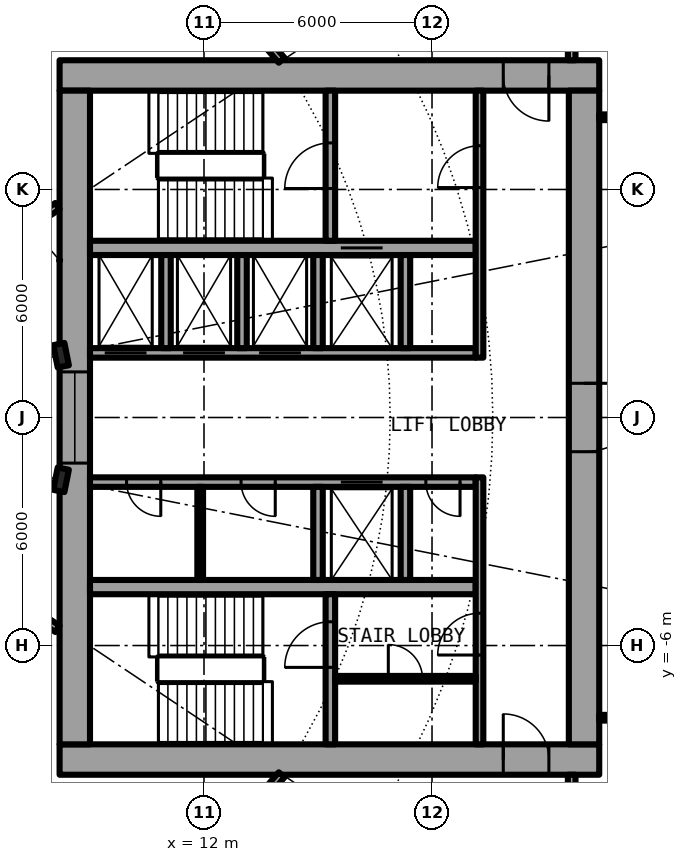
"""IFC4 building model, lengths in metres.
Left out: names, types, materials, properties, quantities, classifications, styles, units other than length and angle.
Written with IfcOpenShell. Run it as: python <this file> out.ifc"""

import sys

from ifc_helpers import new_model, si_unit, direction, frame, frame_2d, origin, origin_2d, place, context, subcontext, project, spatial, rectangle, i_section, extrude, element, fill, save


model = new_model("IFC4")
c1 = context("Model", 3, precision=1e-05, world=origin(), true_north=direction((0.0, 1.0)))
c2 = subcontext(c1, "Body", "Model", "MODEL_VIEW")
j1 = project(units=[si_unit("LENGTHUNIT", "METRE"), si_unit("PLANEANGLEUNIT", "RADIAN")], contexts=[c1])
p1 = place(None, origin())
s1 = spatial("IfcSite", under=j1, at=p1, CompositionType="ELEMENT")
p2 = place(p1, origin())
s2 = spatial("IfcBuilding", under=s1, at=p2, CompositionType="ELEMENT")
p3 = place(p2, frame((0.0, 0.0, 9.6)))
s3 = spatial("IfcBuildingStorey", under=s2, at=p3, CompositionType="ELEMENT", Elevation=9.6)
for number, where, z_axis, x_axis in (
    (1, (8.239, 1.639, 0.0), (0.0, 0.0, 1.0), (0.981, 0.195, 0.0)),
    (2, (8.239, -1.639, 0.0), (0.0, 0.0, 1.0), (0.981, -0.195, 0.0)),
):
    element("IfcColumn", number, at=place(p3, frame(where, z_axis=z_axis, x_axis=x_axis)), inside=s3, PredefinedType="COLUMN", context=c2, shape_type="SweptSolid", body=[
        extrude(i_section(OverallWidth=0.3, OverallDepth=0.6, WebThickness=0.015, FlangeThickness=0.03, FilletRadius=0.027, at=origin_2d()), origin(), (0.0, 0.0, 1.0), 4.5),
    ])
p4 = place(p3, frame((22.4, 9.0, 0.0), z_axis=(0.0, 0.0, 1.0), x_axis=(-1.0, 0.0, 0.0)))
e3 = element("IfcWall", 3, at=p4, inside=s3, PredefinedType="SHEAR", context=c2, shape_type="SweptSolid", body=[
    extrude(rectangle(XDim=14.2, YDim=0.8, at=frame_2d((7.1, 0.0))), origin(), (0.0, 0.0, 1.0), 4.5),
])
p5 = place(p4, frame((1.325, 0.0, 0.0)))
e4 = element("IfcOpeningElement", 4, at=p5, cuts=e3, PredefinedType="OPENING", context=c2, shape_type="SweptSolid", body=[
    extrude(rectangle(XDim=1.2, YDim=2.3, at=frame_2d((0.6, 1.15))), frame((0.0, 0.41, 0.0), z_axis=(0.0, -1.0, 0.0), x_axis=(1.0, 0.0, 0.0)), (0.0, 0.0, 1.0), 0.82),
])
p6 = place(p3, frame((8.2, -9.0, 0.0), z_axis=(0.0, 0.0, 1.0), x_axis=(1.0, 0.0, 0.0)))
e5 = element("IfcWall", 5, at=p6, inside=s3, PredefinedType="SHEAR", context=c2, shape_type="SweptSolid", body=[
    extrude(rectangle(XDim=14.2, YDim=0.8, at=frame_2d((7.1, 0.0))), origin(), (0.0, 0.0, 1.0), 4.5),
])
p7 = place(p6, frame((11.675, 0.0, 0.0)))
e6 = element("IfcOpeningElement", 6, at=p7, cuts=e5, PredefinedType="OPENING", context=c2, shape_type="SweptSolid", body=[
    extrude(rectangle(XDim=1.2, YDim=2.3, at=frame_2d((0.6, 1.15))), frame((0.0, 0.41, 0.0), z_axis=(0.0, -1.0, 0.0), x_axis=(1.0, 0.0, 0.0)), (0.0, 0.0, 1.0), 0.82),
])
p8 = place(p3, frame((22.0, 8.6, 0.0), z_axis=(0.0, 0.0, 1.0), x_axis=(0.0, -1.0, 0.0)))
e7 = element("IfcWall", 7, at=p8, inside=s3, PredefinedType="SHEAR", context=c2, shape_type="SweptSolid", body=[
    extrude(rectangle(XDim=17.2, YDim=0.8, at=frame_2d((8.6, 0.0))), origin(), (0.0, 0.0, 1.0), 4.5),
])
p9 = place(p8, frame((7.7, 0.0, 0.0)))
e8 = element("IfcOpeningElement", 8, at=p9, cuts=e7, PredefinedType="OPENING", context=c2, shape_type="SweptSolid", body=[
    extrude(rectangle(XDim=1.8, YDim=2.3, at=frame_2d((0.9, 1.15))), frame((0.0, 0.41, 0.0), z_axis=(0.0, -1.0, 0.0), x_axis=(1.0, 0.0, 0.0)), (0.0, 0.0, 1.0), 0.82),
])
p10 = place(p3, frame((8.6, -8.6, 0.0), z_axis=(0.0, 0.0, 1.0), x_axis=(0.0, 1.0, 0.0)))
e9 = element("IfcWall", 9, at=p10, inside=s3, PredefinedType="SHEAR", context=c2, shape_type="SweptSolid", body=[
    extrude(rectangle(XDim=17.2, YDim=0.8, at=frame_2d((8.6, 0.0))), origin(), (0.0, 0.0, 1.0), 4.5),
])
p11 = place(p10, frame((7.4, 0.0, 0.1)))
e10 = element("IfcOpeningElement", 10, at=p11, cuts=e9, PredefinedType="OPENING", context=c2, shape_type="SweptSolid", body=[
    extrude(rectangle(XDim=2.4, YDim=2.2, at=frame_2d((1.2, 1.1))), frame((0.0, 0.41, 0.0), z_axis=(0.0, -1.0, 0.0), x_axis=(1.0, 0.0, 0.0)), (0.0, 0.0, 1.0), 0.82),
])
p12 = place(p3, frame((9.0, 1.7, 0.0), z_axis=(0.0, 0.0, 1.0), x_axis=(1.0, 0.0, 0.0)))
e11 = element("IfcWall", 11, at=p12, inside=s3, PredefinedType="SHEAR", context=c2, shape_type="SweptSolid", body=[
    extrude(rectangle(XDim=10.15, YDim=0.25, at=frame_2d((5.075, 0.0))), origin(), (0.0, 0.0, 1.0), 4.5),
])
p13 = place(p12, frame((0.387, 0.0, 0.0)))
e12 = element("IfcOpeningElement", 12, at=p13, cuts=e11, PredefinedType="OPENING", context=c2, shape_type="SweptSolid", body=[
    extrude(rectangle(XDim=1.1, YDim=2.3, at=frame_2d((0.55, 1.15))), frame((0.0, 0.135, 0.0), z_axis=(0.0, -1.0, 0.0), x_axis=(1.0, 0.0, 0.0)), (0.0, 0.0, 1.0), 0.27),
])
p14 = place(p12, frame((2.45, 0.0, 0.0)))
e13 = element("IfcOpeningElement", 13, at=p14, cuts=e11, PredefinedType="OPENING", context=c2, shape_type="SweptSolid", body=[
    extrude(rectangle(XDim=1.1, YDim=2.3, at=frame_2d((0.55, 1.15))), frame((0.0, 0.135, 0.0), z_axis=(0.0, -1.0, 0.0), x_axis=(1.0, 0.0, 0.0)), (0.0, 0.0, 1.0), 0.27),
])
p15 = place(p12, frame((4.45, 0.0, 0.0)))
e14 = element("IfcOpeningElement", 14, at=p15, cuts=e11, PredefinedType="OPENING", context=c2, shape_type="SweptSolid", body=[
    extrude(rectangle(XDim=1.1, YDim=2.3, at=frame_2d((0.55, 1.15))), frame((0.0, 0.135, 0.0), z_axis=(0.0, -1.0, 0.0), x_axis=(1.0, 0.0, 0.0)), (0.0, 0.0, 1.0), 0.27),
])
p16 = place(p3, frame((9.0, 4.462, 0.0), z_axis=(0.0, 0.0, 1.0), x_axis=(1.0, 0.0, 0.0)))
e15 = element("IfcWall", 15, at=p16, inside=s3, PredefinedType="SHEAR", context=c2, shape_type="SweptSolid", body=[
    extrude(rectangle(XDim=10.15, YDim=0.375, at=frame_2d((5.075, 0.0))), origin(), (0.0, 0.0, 1.0), 4.5),
])
p17 = place(p16, frame((6.6, 0.0, 0.0)))
e16 = element("IfcOpeningElement", 16, at=p17, cuts=e15, PredefinedType="OPENING", context=c2, shape_type="SweptSolid", body=[
    extrude(rectangle(XDim=1.1, YDim=2.3, at=frame_2d((0.55, 1.15))), frame((0.0, 0.198, 0.0), z_axis=(0.0, -1.0, 0.0), x_axis=(1.0, 0.0, 0.0)), (0.0, 0.0, 1.0), 0.395),
])
p18 = place(p3, frame((15.325, 4.65, 0.0), z_axis=(0.0, 0.0, 1.0), x_axis=(0.0, 1.0, 0.0)))
e17 = element("IfcWall", 17, at=p18, inside=s3, PredefinedType="SHEAR", context=c2, shape_type="SweptSolid", body=[
    extrude(rectangle(XDim=3.95, YDim=0.25, at=frame_2d((1.975, 0.0))), origin(), (0.0, 0.0, 1.0), 4.5),
])
p19 = place(p18, frame((1.375, 0.0, 0.0)))
e18 = element("IfcOpeningElement", 18, at=p19, cuts=e17, PredefinedType="OPENING", context=c2, shape_type="SweptSolid", body=[
    extrude(rectangle(XDim=1.2, YDim=2.3, at=frame_2d((0.6, 1.15))), frame((0.0, 0.135, 0.0), z_axis=(0.0, -1.0, 0.0), x_axis=(1.0, 0.0, 0.0)), (0.0, 0.0, 1.0), 0.27),
])
for number, where, z_axis, x_axis in (
    (19, (15.0, 1.825, 0.0), (0.0, 0.0, 1.0), (0.0, 1.0, 0.0)),
    (20, (17.3, 1.825, 0.0), (0.0, 0.0, 1.0), (0.0, 1.0, 0.0)),
):
    element("IfcWall", number, at=place(p3, frame(where, z_axis=z_axis, x_axis=x_axis)), inside=s3, PredefinedType="SOLIDWALL", context=c2, shape_type="SweptSolid", body=[
        extrude(rectangle(XDim=2.45, YDim=0.25, at=frame_2d((1.225, 0.0))), origin(), (0.0, 0.0, 1.0), 4.05),
    ])
p20 = place(p3, frame((19.25, 1.575, 0.0), z_axis=(0.0, 0.0, 1.0), x_axis=(0.0, 1.0, 0.0)))
e21 = element("IfcWall", 21, at=p20, inside=s3, PredefinedType="SOLIDWALL", context=c2, shape_type="SweptSolid", body=[
    extrude(rectangle(XDim=7.025, YDim=0.2, at=frame_2d((3.513, 0.0))), origin(), (0.0, 0.0, 1.0), 4.05),
])
p21 = place(p20, frame((4.475, 0.0, 0.0)))
e22 = element("IfcOpeningElement", 22, at=p21, cuts=e21, PredefinedType="OPENING", context=c2, shape_type="SweptSolid", body=[
    extrude(rectangle(XDim=1.1, YDim=2.3, at=frame_2d((0.55, 1.15))), frame((0.0, 0.11, 0.0), z_axis=(0.0, -1.0, 0.0), x_axis=(1.0, 0.0, 0.0)), (0.0, 0.0, 1.0), 0.22),
])
p22 = place(p3, frame((19.15, -1.7, 0.0), z_axis=(0.0, 0.0, 1.0), x_axis=(-1.0, 0.0, 0.0)))
e23 = element("IfcWall", 23, at=p22, inside=s3, PredefinedType="SHEAR", context=c2, shape_type="SweptSolid", body=[
    extrude(rectangle(XDim=10.15, YDim=0.25, at=frame_2d((5.075, 0.0))), origin(), (0.0, 0.0, 1.0), 4.5),
])
p23 = place(p22, frame((2.45, 0.0, 0.0)))
e24 = element("IfcOpeningElement", 24, at=p23, cuts=e23, PredefinedType="OPENING", context=c2, shape_type="SweptSolid", body=[
    extrude(rectangle(XDim=1.1, YDim=2.3, at=frame_2d((0.55, 1.15))), frame((0.0, 0.135, 0.0), z_axis=(0.0, -1.0, 0.0), x_axis=(1.0, 0.0, 0.0)), (0.0, 0.0, 1.0), 0.27),
])
p24 = place(p22, frame((8.288, 0.0, 0.0)))
e25 = element("IfcOpeningElement", 25, at=p24, cuts=e23, PredefinedType="OPENING", context=c2, shape_type="SweptSolid", body=[
    extrude(rectangle(XDim=0.9, YDim=2.3, at=frame_2d((0.45, 1.15))), frame((0.0, 0.135, 0.0), z_axis=(0.0, -1.0, 0.0), x_axis=(1.0, 0.0, 0.0)), (0.0, 0.0, 1.0), 0.27),
])
p25 = place(p22, frame((5.275, 0.0, 0.0)))
e26 = element("IfcOpeningElement", 26, at=p25, cuts=e23, PredefinedType="OPENING", context=c2, shape_type="SweptSolid", body=[
    extrude(rectangle(XDim=0.9, YDim=2.3, at=frame_2d((0.45, 1.15))), frame((0.0, 0.135, 0.0), z_axis=(0.0, -1.0, 0.0), x_axis=(1.0, 0.0, 0.0)), (0.0, 0.0, 1.0), 0.27),
])
p26 = place(p22, frame((0.413, 0.0, 0.0)))
e27 = element("IfcOpeningElement", 27, at=p26, cuts=e23, PredefinedType="OPENING", context=c2, shape_type="SweptSolid", body=[
    extrude(rectangle(XDim=0.9, YDim=2.3, at=frame_2d((0.45, 1.15))), frame((0.0, 0.135, 0.0), z_axis=(0.0, -1.0, 0.0), x_axis=(1.0, 0.0, 0.0)), (0.0, 0.0, 1.0), 0.27),
])
p27 = place(p3, frame((9.0, -4.462, 0.0), z_axis=(0.0, 0.0, 1.0), x_axis=(1.0, 0.0, 0.0)))
e28 = element("IfcWall", 28, at=p27, inside=s3, PredefinedType="SHEAR", context=c2, shape_type="SweptSolid", body=[
    extrude(rectangle(XDim=10.15, YDim=0.375, at=frame_2d((5.075, 0.0))), origin(), (0.0, 0.0, 1.0), 4.5),
])
p28 = place(p3, frame((15.325, -8.6, 0.0), z_axis=(0.0, 0.0, 1.0), x_axis=(0.0, 1.0, 0.0)))
e29 = element("IfcWall", 29, at=p28, inside=s3, PredefinedType="SHEAR", context=c2, shape_type="SweptSolid", body=[
    extrude(rectangle(XDim=3.95, YDim=0.25, at=frame_2d((1.975, 0.0))), origin(), (0.0, 0.0, 1.0), 4.5),
])
p29 = place(p28, frame((2.025, 0.0, 0.0)))
e30 = element("IfcOpeningElement", 30, at=p29, cuts=e29, PredefinedType="OPENING", context=c2, shape_type="SweptSolid", body=[
    extrude(rectangle(XDim=1.2, YDim=2.3, at=frame_2d((0.6, 1.15))), frame((0.0, 0.135, 0.0), z_axis=(0.0, -1.0, 0.0), x_axis=(1.0, 0.0, 0.0)), (0.0, 0.0, 1.0), 0.27),
])
for number, where, z_axis, x_axis in (
    (31, (15.0, -1.825, 0.0), (0.0, 0.0, 1.0), (0.0, -1.0, 0.0)),
    (32, (17.3, -1.825, 0.0), (0.0, 0.0, 1.0), (0.0, -1.0, 0.0)),
):
    element("IfcWall", number, at=place(p3, frame(where, z_axis=z_axis, x_axis=x_axis)), inside=s3, PredefinedType="SOLIDWALL", context=c2, shape_type="SweptSolid", body=[
        extrude(rectangle(XDim=2.45, YDim=0.25, at=frame_2d((1.225, 0.0))), origin(), (0.0, 0.0, 1.0), 4.05),
    ])
p30 = place(p3, frame((19.25, -8.6, 0.0), z_axis=(0.0, 0.0, 1.0), x_axis=(0.0, 1.0, 0.0)))
e33 = element("IfcWall", 33, at=p30, inside=s3, PredefinedType="SOLIDWALL", context=c2, shape_type="SweptSolid", body=[
    extrude(rectangle(XDim=7.025, YDim=0.2, at=frame_2d((3.513, 0.0))), origin(), (0.0, 0.0, 1.0), 4.05),
])
p31 = place(p30, frame((2.35, 0.0, 0.0)))
e34 = element("IfcOpeningElement", 34, at=p31, cuts=e33, PredefinedType="OPENING", context=c2, shape_type="SweptSolid", body=[
    extrude(rectangle(XDim=1.1, YDim=2.3, at=frame_2d((0.55, 1.15))), frame((0.0, 0.11, 0.0), z_axis=(0.0, -1.0, 0.0), x_axis=(1.0, 0.0, 0.0)), (0.0, 0.0, 1.0), 0.22),
])
for number, where, z_axis, x_axis in (
    (35, (11.0, 1.825, 0.0), (0.0, 0.0, 1.0), (0.0, 1.0, 0.0)),
    (36, (13.0, 1.825, 0.0), (0.0, 0.0, 1.0), (0.0, 1.0, 0.0)),
):
    element("IfcWall", number, at=place(p3, frame(where, z_axis=z_axis, x_axis=x_axis)), inside=s3, PredefinedType="SOLIDWALL", context=c2, shape_type="SweptSolid", body=[
        extrude(rectangle(XDim=2.45, YDim=0.25, at=frame_2d((1.225, 0.0))), origin(), (0.0, 0.0, 1.0), 4.05),
    ])
p32 = place(p3, frame((11.9, -1.825, 0.0), z_axis=(0.0, 0.0, 1.0), x_axis=(0.0, -1.0, 0.0)))
e37 = element("IfcWall", 37, at=p32, inside=s3, PredefinedType="PARTITIONING", context=c2, shape_type="SweptSolid", body=[
    extrude(rectangle(XDim=2.45, YDim=0.15, at=frame_2d((1.225, 0.0))), origin(), (0.0, 0.0, 1.0), 4.05),
])
p33 = place(p3, frame((15.45, -6.875, 0.0), z_axis=(0.0, 0.0, 1.0), x_axis=(1.0, 0.0, 0.0)))
e38 = element("IfcWall", 38, at=p33, inside=s3, PredefinedType="PARTITIONING", context=c2, shape_type="SweptSolid", body=[
    extrude(rectangle(XDim=3.7, YDim=0.15, at=frame_2d((1.85, 0.0))), origin(), (0.0, 0.0, 1.0), 4.05),
])
p34 = place(p33, frame((1.4, 0.0, 0.0)))
e39 = element("IfcOpeningElement", 39, at=p34, cuts=e38, PredefinedType="OPENING", context=c2, shape_type="SweptSolid", body=[
    extrude(rectangle(XDim=0.9, YDim=2.3, at=frame_2d((0.45, 1.15))), frame((0.0, 0.085, 0.0), z_axis=(0.0, -1.0, 0.0), x_axis=(1.0, 0.0, 0.0)), (0.0, 0.0, 1.0), 0.17),
])
for number, where, z_axis, x_axis in (
    (40, (22.4, -7.9, 0.0), (0.0, 0.0, 1.0), (1.0, 0.0, 0.0)),
    (41, (22.4, 7.9, 0.0), (0.0, 0.0, 1.0), (1.0, 0.0, 0.0)),
):
    element("IfcWall", number, at=place(p3, frame(where, z_axis=z_axis, x_axis=x_axis)), inside=s3, PredefinedType="PARTITIONING", context=c2, shape_type="SweptSolid", body=[
        extrude(rectangle(XDim=2.54, YDim=0.15, at=frame_2d((1.27, 0.0))), origin(), (0.0, 0.0, 1.0), 4.05),
    ])
for number, where, z_axis, x_axis in (
    (42, (21.675, -11.0, 0.0), (0.0, 0.0, 1.0), (0.0, 1.0, 0.0)),
    (43, (21.675, 9.4, 0.0), (0.0, 0.0, 1.0), (0.0, 1.0, 0.0)),
):
    element("IfcWall", number, at=place(p3, frame(where, z_axis=z_axis, x_axis=x_axis)), inside=s3, PredefinedType="PARTITIONING", context=c2, shape_type="SweptSolid", body=[
        extrude(rectangle(XDim=1.6, YDim=0.2, at=frame_2d((0.8, 0.0))), origin(), (0.0, 0.0, 1.0), 4.05),
    ])
p35 = place(p3, frame((11.349, -12.522, 0.0), z_axis=(0.0, 0.0, 1.0), x_axis=(0.653274518104, 0.757121129012, 0.0)))
e44 = element("IfcWall", 44, at=p35, inside=s3, PredefinedType="PARTITIONING", context=c2, shape_type="SweptSolid", body=[
    extrude(rectangle(XDim=4.124, YDim=0.2, at=frame_2d((2.062, 0.0))), origin(), (0.0, 0.0, 1.0), 4.05),
])
p36 = place(p3, frame((6.513, -4.472, 0.0), z_axis=(0.0, 0.0, 1.0), x_axis=(0.831417956244, -0.555647533996, 0.0)))
e45 = element("IfcWall", 45, at=p36, inside=s3, PredefinedType="PARTITIONING", context=c2, shape_type="SweptSolid", body=[
    extrude(rectangle(XDim=1.962, YDim=0.2, at=frame_2d((0.981, 0.0))), origin(), (0.0, 0.0, 1.0), 4.05),
])
p37 = place(p3, frame((3.639, -6.808, 0.0), z_axis=(0.0, 0.0, 1.0), x_axis=(0.471460365694, -0.881887251059, 0.0)))
e46 = element("IfcWall", 46, at=p37, inside=s3, PredefinedType="PARTITIONING", context=c2, shape_type="SweptSolid", body=[
    extrude(rectangle(XDim=9.18, YDim=0.15, at=frame_2d((4.59, 0.0))), origin(), (0.0, 0.0, 1.0), 4.05),
])
p38 = place(p3, frame((3.641, 6.807, 0.0), z_axis=(0.0, 0.0, 1.0), x_axis=(0.471428625665, 0.881904218667, 0.0)))
e47 = element("IfcWall", 47, at=p38, inside=s3, PredefinedType="PARTITIONING", context=c2, shape_type="SweptSolid", body=[
    extrude(rectangle(XDim=9.18, YDim=0.15, at=frame_2d((4.59, 0.0))), origin(), (0.0, 0.0, 1.0), 4.05),
])
p39 = place(p3, frame((6.513, 4.472, 0.0), z_axis=(0.0, 0.0, 1.0), x_axis=(0.831417956244, 0.555647533996, 0.0)))
e48 = element("IfcWall", 48, at=p39, inside=s3, PredefinedType="PARTITIONING", context=c2, shape_type="SweptSolid", body=[
    extrude(rectangle(XDim=1.962, YDim=0.2, at=frame_2d((0.981, 0.0))), origin(), (0.0, 0.0, 1.0), 4.05),
])
p40 = place(p3, frame((11.349, 12.522, 0.0), z_axis=(0.0, 0.0, 1.0), x_axis=(0.653274518104, -0.757121129012, 0.0)))
e49 = element("IfcWall", 49, at=p40, inside=s3, PredefinedType="PARTITIONING", context=c2, shape_type="SweptSolid", body=[
    extrude(rectangle(XDim=4.124, YDim=0.2, at=frame_2d((2.062, 0.0))), origin(), (0.0, 0.0, 1.0), 4.05),
])
p41 = place(p13, origin())
e50 = element("IfcDoor", 50, at=p41, inside=s3, OperationType="DOUBLE_DOOR_SLIDING", PredefinedType="DOOR", context=c2, shape_type="SweptSolid", body=[
    extrude(rectangle(XDim=1.1, YDim=2.3, at=frame_2d((0.55, 1.15))), frame((0.0, 0.025, 0.0), z_axis=(0.0, -1.0, 0.0), x_axis=(1.0, 0.0, 0.0)), (0.0, 0.0, 1.0), 0.05),
])
fill(e12, e50)
p42 = place(p14, origin())
e51 = element("IfcDoor", 51, at=p42, inside=s3, OperationType="DOUBLE_DOOR_SLIDING", PredefinedType="DOOR", context=c2, shape_type="SweptSolid", body=[
    extrude(rectangle(XDim=1.1, YDim=2.3, at=frame_2d((0.55, 1.15))), frame((0.0, 0.025, 0.0), z_axis=(0.0, -1.0, 0.0), x_axis=(1.0, 0.0, 0.0)), (0.0, 0.0, 1.0), 0.05),
])
fill(e13, e51)
p43 = place(p15, origin())
e52 = element("IfcDoor", 52, at=p43, inside=s3, OperationType="DOUBLE_DOOR_SLIDING", PredefinedType="DOOR", context=c2, shape_type="SweptSolid", body=[
    extrude(rectangle(XDim=1.1, YDim=2.3, at=frame_2d((0.55, 1.15))), frame((0.0, 0.025, 0.0), z_axis=(0.0, -1.0, 0.0), x_axis=(1.0, 0.0, 0.0)), (0.0, 0.0, 1.0), 0.05),
])
fill(e14, e52)
p44 = place(p17, origin())
e53 = element("IfcDoor", 53, at=p44, inside=s3, OperationType="DOUBLE_DOOR_SLIDING", PredefinedType="DOOR", context=c2, shape_type="SweptSolid", body=[
    extrude(rectangle(XDim=1.1, YDim=2.3, at=frame_2d((0.55, 1.15))), frame((0.0, 0.025, 0.0), z_axis=(0.0, -1.0, 0.0), x_axis=(1.0, 0.0, 0.0)), (0.0, 0.0, 1.0), 0.05),
])
fill(e16, e53)
p45 = place(p23, origin())
e54 = element("IfcDoor", 54, at=p45, inside=s3, OperationType="DOUBLE_DOOR_SLIDING", PredefinedType="DOOR", context=c2, shape_type="SweptSolid", body=[
    extrude(rectangle(XDim=1.1, YDim=2.3, at=frame_2d((0.55, 1.15))), frame((0.0, 0.025, 0.0), z_axis=(0.0, -1.0, 0.0), x_axis=(1.0, 0.0, 0.0)), (0.0, 0.0, 1.0), 0.05),
])
fill(e24, e54)
p46 = place(p24, origin())
e55 = element("IfcDoor", 55, at=p46, inside=s3, OperationType="SINGLE_SWING_LEFT", PredefinedType="DOOR", context=c2, shape_type="SweptSolid", body=[
    extrude(rectangle(XDim=0.9, YDim=2.3, at=frame_2d((0.45, 1.15))), frame((0.0, 0.025, 0.0), z_axis=(0.0, -1.0, 0.0), x_axis=(1.0, 0.0, 0.0)), (0.0, 0.0, 1.0), 0.05),
])
fill(e25, e55)
p47 = place(p25, origin())
e56 = element("IfcDoor", 56, at=p47, inside=s3, OperationType="SINGLE_SWING_LEFT", PredefinedType="DOOR", context=c2, shape_type="SweptSolid", body=[
    extrude(rectangle(XDim=0.9, YDim=2.3, at=frame_2d((0.45, 1.15))), frame((0.0, 0.025, 0.0), z_axis=(0.0, -1.0, 0.0), x_axis=(1.0, 0.0, 0.0)), (0.0, 0.0, 1.0), 0.05),
])
fill(e26, e56)
p48 = place(p26, origin())
e57 = element("IfcDoor", 57, at=p48, inside=s3, OperationType="SINGLE_SWING_RIGHT", PredefinedType="DOOR", context=c2, shape_type="SweptSolid", body=[
    extrude(rectangle(XDim=0.9, YDim=2.3, at=frame_2d((0.45, 1.15))), frame((0.0, 0.025, 0.0), z_axis=(0.0, -1.0, 0.0), x_axis=(1.0, 0.0, 0.0)), (0.0, 0.0, 1.0), 0.05),
])
fill(e27, e57)
p49 = place(p34, origin())
e58 = element("IfcDoor", 58, at=p49, inside=s3, OperationType="SINGLE_SWING_LEFT", PredefinedType="DOOR", context=c2, shape_type="SweptSolid", body=[
    extrude(rectangle(XDim=0.9, YDim=2.3, at=frame_2d((0.45, 1.15))), frame((0.0, 0.025, 0.0), z_axis=(0.0, -1.0, 0.0), x_axis=(1.0, 0.0, 0.0)), (0.0, 0.0, 1.0), 0.05),
])
fill(e39, e58)
p50 = place(p19, origin())
e59 = element("IfcDoor", 59, at=p50, inside=s3, OperationType="SINGLE_SWING_LEFT", PredefinedType="DOOR", context=c2, shape_type="SweptSolid", body=[
    extrude(rectangle(XDim=1.2, YDim=2.3, at=frame_2d((0.6, 1.15))), frame((0.0, 0.025, 0.0), z_axis=(0.0, -1.0, 0.0), x_axis=(1.0, 0.0, 0.0)), (0.0, 0.0, 1.0), 0.05),
])
fill(e18, e59)
p51 = place(p29, origin())
e60 = element("IfcDoor", 60, at=p51, inside=s3, OperationType="SINGLE_SWING_LEFT", PredefinedType="DOOR", context=c2, shape_type="SweptSolid", body=[
    extrude(rectangle(XDim=1.2, YDim=2.3, at=frame_2d((0.6, 1.15))), frame((0.0, 0.025, 0.0), z_axis=(0.0, -1.0, 0.0), x_axis=(1.0, 0.0, 0.0)), (0.0, 0.0, 1.0), 0.05),
])
fill(e30, e60)
p52 = place(p21, origin())
e61 = element("IfcDoor", 61, at=p52, inside=s3, OperationType="SINGLE_SWING_LEFT", PredefinedType="DOOR", context=c2, shape_type="SweptSolid", body=[
    extrude(rectangle(XDim=1.1, YDim=2.3, at=frame_2d((0.55, 1.15))), frame((0.0, 0.025, 0.0), z_axis=(0.0, -1.0, 0.0), x_axis=(1.0, 0.0, 0.0)), (0.0, 0.0, 1.0), 0.05),
])
fill(e22, e61)
p53 = place(p31, origin())
e62 = element("IfcDoor", 62, at=p53, inside=s3, OperationType="SINGLE_SWING_RIGHT", PredefinedType="DOOR", context=c2, shape_type="SweptSolid", body=[
    extrude(rectangle(XDim=1.1, YDim=2.3, at=frame_2d((0.55, 1.15))), frame((0.0, 0.025, 0.0), z_axis=(0.0, -1.0, 0.0), x_axis=(1.0, 0.0, 0.0)), (0.0, 0.0, 1.0), 0.05),
])
fill(e34, e62)
p54 = place(p5, origin())
e63 = element("IfcDoor", 63, at=p54, inside=s3, OperationType="SINGLE_SWING_RIGHT", PredefinedType="DOOR", context=c2, shape_type="SweptSolid", body=[
    extrude(rectangle(XDim=1.2, YDim=2.3, at=frame_2d((0.6, 1.15))), frame((0.0, 0.025, 0.0), z_axis=(0.0, -1.0, 0.0), x_axis=(1.0, 0.0, 0.0)), (0.0, 0.0, 1.0), 0.05),
])
fill(e4, e63)
p55 = place(p7, origin())
e64 = element("IfcDoor", 64, at=p55, inside=s3, OperationType="SINGLE_SWING_LEFT", PredefinedType="DOOR", context=c2, shape_type="SweptSolid", body=[
    extrude(rectangle(XDim=1.2, YDim=2.3, at=frame_2d((0.6, 1.15))), frame((0.0, 0.025, 0.0), z_axis=(0.0, -1.0, 0.0), x_axis=(1.0, 0.0, 0.0)), (0.0, 0.0, 1.0), 0.05),
])
fill(e6, e64)
p56 = place(p9, origin())
e65 = element("IfcDoor", 65, at=p56, inside=s3, OperationType="SINGLE_SWING_LEFT", PredefinedType="DOOR", context=c2, shape_type="SweptSolid", body=[
    extrude(rectangle(XDim=1.8, YDim=2.3, at=frame_2d((0.9, 1.15))), frame((0.0, 0.025, 0.0), z_axis=(0.0, -1.0, 0.0), x_axis=(1.0, 0.0, 0.0)), (0.0, 0.0, 1.0), 0.05),
])
fill(e8, e65)
p57 = place(p11, origin())
e66 = element("IfcWindow", 66, at=p57, inside=s3, PartitioningType="SINGLE_PANEL", PredefinedType="WINDOW", context=c2, shape_type="SweptSolid", body=[
    extrude(rectangle(XDim=2.4, YDim=2.2, at=frame_2d((1.2, 1.1))), frame((0.0, 0.03, 0.0), z_axis=(0.0, -1.0, 0.0), x_axis=(1.0, 0.0, 0.0)), (0.0, 0.0, 1.0), 0.06),
])
fill(e10, e66)
save(model, sys.argv[1])
